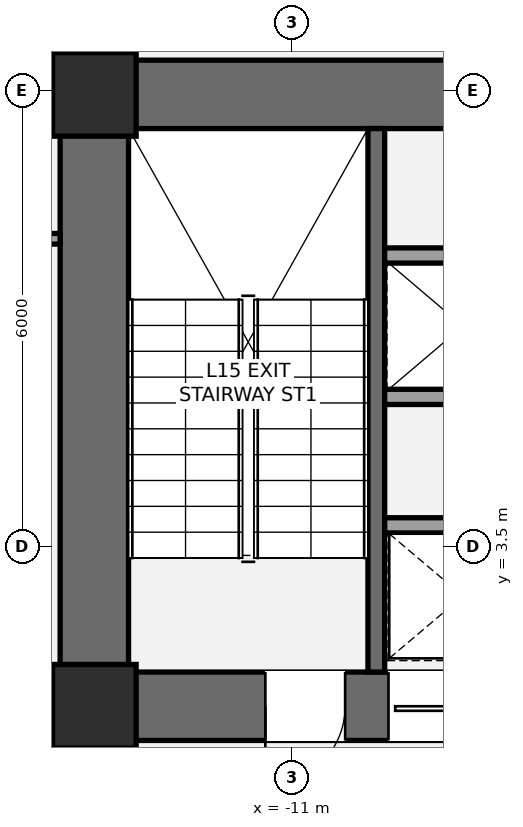
"""IFC4 building model, lengths in metres.
Left out: names, types, materials, properties, quantities, classifications, styles, units other than length and angle.
Written with IfcOpenShell. Run it as: python <this file> out.ifc"""

import sys

from ifc_helpers import new_model, si_unit, direction, frame, frame_2d, origin, origin_2d, place, context, subcontext, project, spatial, rectangle, extrude, element, fill, save


model = new_model("IFC4")
c1 = context("Model", 3, precision=1e-05, world=origin(), true_north=direction((0.0, 1.0)))
c2 = subcontext(c1, "Body", "Model", "MODEL_VIEW")
j1 = project(units=[si_unit("LENGTHUNIT", "METRE"), si_unit("PLANEANGLEUNIT", "RADIAN")], contexts=[c1])
p1 = place(None, origin())
s1 = spatial("IfcSite", under=j1, at=p1, CompositionType="ELEMENT")
p2 = place(p1, origin())
s2 = spatial("IfcBuilding", under=s1, at=p2, CompositionType="ELEMENT")
p3 = place(p2, frame((0.0, 0.0, 59.4)))
s3 = spatial("IfcBuildingStorey", under=s2, at=p3, CompositionType="ELEMENT", Elevation=59.4)
p4 = place(p3, frame((-13.6, 0.95, 0.0), z_axis=(0.0, 0.0, 1.0), x_axis=(0.0, 1.0, 0.0)))
e1 = element("IfcWall", 1, at=p4, inside=s3, PredefinedType="SHEAR", context=c2, shape_type="SweptSolid", body=[
    extrude(rectangle(XDim=8.95, YDim=0.9, at=frame_2d((4.475, 0.0))), origin(), (0.0, 0.0, 1.0), 3.6),
])
p5 = place(p3, frame((-14.05, 9.45, 0.0), z_axis=(0.0, 0.0, 1.0), x_axis=(1.0, 0.0, 0.0)))
e2 = element("IfcWall", 2, at=p5, inside=s3, PredefinedType="SHEAR", context=c2, shape_type="SweptSolid", body=[
    extrude(rectangle(XDim=9.7, YDim=0.9, at=frame_2d((4.85, 0.0))), origin(), (0.0, 0.0, 1.0), 3.6),
])
p6 = place(p3, frame((-4.75, 1.4, 0.0), z_axis=(0.0, 0.0, 1.0), x_axis=(-1.0, 0.0, 0.0)))
e3 = element("IfcWall", 3, at=p6, inside=s3, PredefinedType="SHEAR", context=c2, shape_type="SweptSolid", body=[
    extrude(rectangle(XDim=9.3, YDim=0.9, at=frame_2d((4.65, 0.0))), origin(), (0.0, 0.0, 1.0), 3.6),
])
p7 = place(p6, frame((5.55, 0.0, 0.0)))
e4 = element("IfcOpeningElement", 4, at=p7, cuts=e3, PredefinedType="OPENING", context=c2, shape_type="SweptSolid", body=[
    extrude(rectangle(XDim=1.05, YDim=2.15, at=frame_2d((0.525, 1.075))), frame((0.0, 0.46, 0.0), z_axis=(0.0, -1.0, 0.0), x_axis=(1.0, 0.0, 0.0)), (0.0, 0.0, 1.0), 0.92),
])
p8 = place(p6, frame((3.88, 0.0, 0.0)))
e5 = element("IfcOpeningElement", 5, at=p8, cuts=e3, PredefinedType="OPENING", context=c2, shape_type="SweptSolid", body=[
    extrude(rectangle(XDim=1.1, YDim=2.2, at=frame_2d((0.55, 1.1))), frame((0.0, 0.46, 0.0), z_axis=(0.0, -1.0, 0.0), x_axis=(1.0, 0.0, 0.0)), (0.0, 0.0, 1.0), 0.92),
])
p9 = place(p3, frame((-9.89, 1.85, 0.0), z_axis=(0.0, 0.0, 1.0), x_axis=(0.0, 1.0, 0.0)))
e6 = element("IfcWall", 6, at=p9, inside=s3, PredefinedType="SHEAR", context=c2, shape_type="SweptSolid", body=[
    extrude(rectangle(XDim=7.15, YDim=0.22, at=frame_2d((3.575, 0.0))), origin(), (0.0, 0.0, 1.0), 3.6),
])
for number, where, z_axis, x_axis in (
    (7, (-13.6, 1.4, 0.0), (0.0, 0.0, 1.0), (1.0, 0.0, 0.0)),
    (8, (-13.6, 9.45, 0.0), (0.0, 0.0, 1.0), (1.0, 0.0, 0.0)),
):
    element("IfcColumn", number, at=place(p3, frame(where, z_axis=z_axis, x_axis=x_axis)), inside=s3, PredefinedType="COLUMN", context=c2, shape_type="SweptSolid", body=[
        extrude(rectangle(XDim=1.1, YDim=1.1, at=origin_2d()), origin(), (0.0, 0.0, 1.0), 3.6),
    ])
p10 = place(p3, frame((-13.45, -2.15, 0.0), z_axis=(0.0, 0.0, 1.0), x_axis=(0.0, 1.0, 0.0)))
e9 = element("IfcWall", 9, at=p10, inside=s3, PredefinedType="PARTITIONING", context=c2, shape_type="SweptSolid", body=[
    extrude(rectangle(XDim=3.15, YDim=0.165, at=frame_2d((1.575, 0.0))), origin(), (0.0, 0.0, 1.0), 2.853),
])
p11 = place(p10, frame((1.15, 0.0, 0.0)))
e10 = element("IfcOpeningElement", 10, at=p11, cuts=e9, PredefinedType="OPENING", context=c2, shape_type="SweptSolid", body=[
    extrude(rectangle(XDim=1.05, YDim=2.15, at=frame_2d((0.525, 1.075))), frame((0.0, 0.093, 0.0), z_axis=(0.0, -1.0, 0.0), x_axis=(1.0, 0.0, 0.0)), (0.0, 0.0, 1.0), 0.185),
])
for number, where, z_axis, x_axis in (
    (11, (-9.78, 3.78, 0.0), (0.0, 0.0, 1.0), (1.0, 0.0, 0.0)),
    (12, (-9.78, 5.47, 0.0), (0.0, 0.0, 1.0), (1.0, 0.0, 0.0)),
    (13, (-9.78, 7.33, 0.0), (0.0, 0.0, 1.0), (1.0, 0.0, 0.0)),
):
    element("IfcWall", number, at=place(p3, frame(where, z_axis=z_axis, x_axis=x_axis)), inside=s3, PredefinedType="SOLIDWALL", context=c2, shape_type="SweptSolid", body=[
        extrude(rectangle(XDim=4.13, YDim=0.2, at=frame_2d((2.065, 0.0))), origin(), (0.0, 0.0, 1.0), 3.4),
    ])
p12 = place(p3, frame((-25.889, 7.55, 0.0), z_axis=(0.0, 0.0, 1.0), x_axis=(1.0, 0.0, 0.0)))
e14 = element("IfcWall", 14, at=p12, inside=s3, PredefinedType="PARTITIONING", context=c2, shape_type="SweptSolid", body=[
    extrude(rectangle(XDim=11.839, YDim=0.14, at=frame_2d((5.92, 0.0))), origin(), (0.0, 0.0, 1.0), 2.853),
])
p13 = place(p12, frame((1.886, 0.0, 0.0)))
e15 = element("IfcOpeningElement", 15, at=p13, cuts=e14, PredefinedType="OPENING", context=c2, shape_type="SweptSolid", body=[
    extrude(rectangle(XDim=0.92, YDim=2.15, at=frame_2d((0.46, 1.075))), frame((0.0, 0.08, 0.0), z_axis=(0.0, -1.0, 0.0), x_axis=(1.0, 0.0, 0.0)), (0.0, 0.0, 1.0), 0.16),
])
p14 = place(p7, origin())
e16 = element("IfcDoor", 16, at=p14, inside=s3, OperationType="SINGLE_SWING_RIGHT", PredefinedType="DOOR", context=c2, shape_type="SweptSolid", body=[
    extrude(rectangle(XDim=1.05, YDim=2.15, at=frame_2d((0.525, 1.075))), frame((0.0, 0.025, 0.0), z_axis=(0.0, -1.0, 0.0), x_axis=(1.0, 0.0, 0.0)), (0.0, 0.0, 1.0), 0.05),
])
fill(e4, e16)
p15 = place(p8, origin())
e17 = element("IfcDoor", 17, at=p15, inside=s3, OperationType="SLIDING_TO_LEFT", PredefinedType="DOOR", context=c2, shape_type="SweptSolid", body=[
    extrude(rectangle(XDim=1.1, YDim=2.2, at=frame_2d((0.55, 1.1))), frame((0.0, 0.025, 0.0), z_axis=(0.0, -1.0, 0.0), x_axis=(1.0, 0.0, 0.0)), (0.0, 0.0, 1.0), 0.05),
])
fill(e5, e17)
save(model, sys.argv[1])
